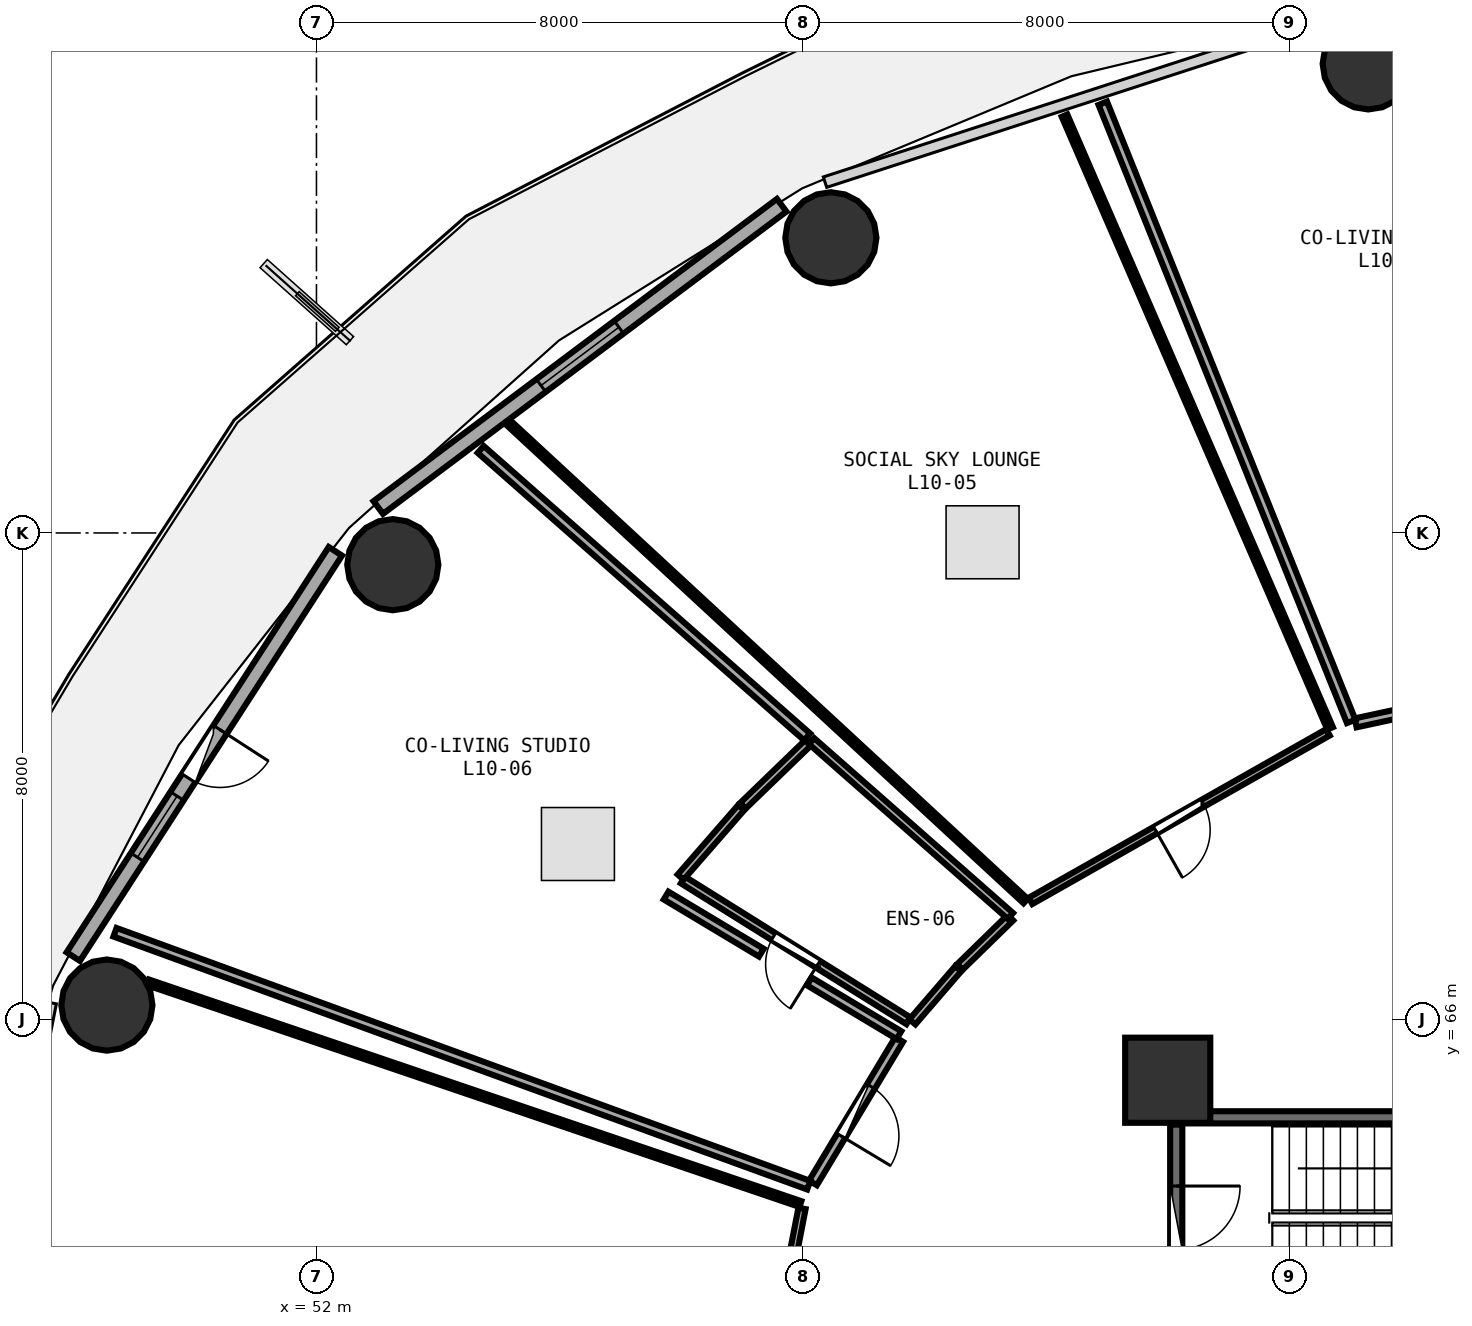
"""IFC4 building model, lengths in metres.
Left out: names, types, materials, properties, quantities, classifications, styles, units other than length and angle.
Written with IfcOpenShell. Run it as: python <this file> out.ifc"""

import sys

from ifc_helpers import new_model, si_unit, direction, frame, frame_2d, origin, origin_2d, place, context, subcontext, project, spatial, rectangle, circle, extrude, element, fill, save


model = new_model("IFC4")
c1 = context("Model", 3, precision=1e-05, world=origin(), true_north=direction((0.0, 1.0)))
c2 = subcontext(c1, "Body", "Model", "MODEL_VIEW")
j1 = project(units=[si_unit("LENGTHUNIT", "METRE"), si_unit("PLANEANGLEUNIT", "RADIAN")], contexts=[c1])
p1 = place(None, origin())
s1 = spatial("IfcSite", under=j1, at=p1, CompositionType="ELEMENT")
p2 = place(p1, origin())
s2 = spatial("IfcBuilding", under=s1, at=p2, CompositionType="ELEMENT")
p3 = place(p2, frame((0.0, 0.0, 41.25)))
s3 = spatial("IfcBuildingStorey", under=s2, at=p3, CompositionType="ELEMENT", Elevation=41.25)
p4 = place(p3, frame((66.0, 65.0, 0.0), z_axis=(0.0, 0.0, 1.0), x_axis=(1.0, 0.0, 0.0)))
e1 = element("IfcColumn", 1, at=p4, inside=s3, PredefinedType="PILASTER", context=c2, shape_type="SweptSolid", body=[
    extrude(rectangle(XDim=1.4, YDim=1.4, at=origin_2d()), origin(), (0.0, 0.0, 1.0), 3.75),
])
for number, where, z_axis, x_axis in (
    (2, (69.298, 81.714, 0.0), (0.0, 0.0, 1.0), (1.0, 0.0, 0.0)),
    (3, (60.46, 78.854, 0.0), (0.0, 0.0, 1.0), (1.0, 0.0, 0.0)),
    (4, (53.256, 73.478, 0.0), (0.0, 0.0, 1.0), (1.0, 0.0, 0.0)),
    (5, (48.553, 66.236, 0.0), (0.0, 0.0, 1.0), (1.0, 0.0, 0.0)),
):
    element("IfcColumn", number, at=place(p3, frame(where, z_axis=z_axis, x_axis=x_axis)), inside=s3, PredefinedType="COLUMN", context=c2, shape_type="SweptSolid", body=[
        extrude(circle(Radius=0.75, at=origin_2d()), origin(), (0.0, 0.0, 1.0), 3.75),
    ])
p5 = place(p3, frame((59.651, 79.389, 0.0), z_axis=(0.0, 0.0, 1.0), x_axis=(-0.80030733173, -0.599590005569, 0.0)))
e6 = element("IfcWall", 6, at=p5, inside=s3, PredefinedType="SOLIDWALL", context=c2, shape_type="SweptSolid", body=[
    extrude(rectangle(XDim=8.291, YDim=0.26, at=frame_2d((4.145, 0.0))), origin(), (0.0, 0.0, 1.0), 3.475),
])
p6 = place(p5, frame((3.345, 0.0, 0.85)))
e7 = element("IfcOpeningElement", 7, at=p6, cuts=e6, PredefinedType="OPENING", context=c2, shape_type="SweptSolid", body=[
    extrude(rectangle(XDim=1.6, YDim=1.45, at=frame_2d((0.8, 0.725))), frame((0.0, 0.14, 0.0), z_axis=(0.0, -1.0, 0.0), x_axis=(1.0, 0.0, 0.0)), (0.0, 0.0, 1.0), 0.28),
])
p7 = place(p3, frame((52.311, 73.698, 0.0), z_axis=(0.0, 0.0, 1.0), x_axis=(-0.543005114258, -0.839729388488, 0.0)))
e8 = element("IfcWall", 8, at=p7, inside=s3, PredefinedType="SOLIDWALL", context=c2, shape_type="SweptSolid", body=[
    extrude(rectangle(XDim=7.938, YDim=0.26, at=frame_2d((3.969, 0.0))), origin(), (0.0, 0.0, 1.0), 3.475),
])
p8 = place(p7, frame((3.494, 0.0, 0.0)))
e9 = element("IfcOpeningElement", 9, at=p8, cuts=e8, PredefinedType="OPENING", context=c2, shape_type="SweptSolid", body=[
    extrude(rectangle(XDim=0.95, YDim=2.1, at=frame_2d((0.475, 1.05))), frame((0.0, 0.14, 0.0), z_axis=(0.0, -1.0, 0.0), x_axis=(1.0, 0.0, 0.0)), (0.0, 0.0, 1.0), 0.28),
])
p9 = place(p7, frame((4.794, 0.0, 0.85)))
e10 = element("IfcOpeningElement", 10, at=p9, cuts=e8, PredefinedType="OPENING", context=c2, shape_type="SweptSolid", body=[
    extrude(rectangle(XDim=1.2, YDim=1.45, at=frame_2d((0.6, 0.725))), frame((0.0, 0.14, 0.0), z_axis=(0.0, -1.0, 0.0), x_axis=(1.0, 0.0, 0.0)), (0.0, 0.0, 1.0), 0.28),
])
p10 = place(p3, frame((73.42, 64.39, 0.0), z_axis=(0.0, 0.0, 1.0), x_axis=(-1.0, 0.0, 0.0)))
e11 = element("IfcWall", 11, at=p10, inside=s3, PredefinedType="SHEAR", context=c2, shape_type="SweptSolid", body=[
    extrude(rectangle(XDim=7.16, YDim=0.2, at=frame_2d((3.58, 0.0))), origin(), (0.0, 0.0, 1.0), 3.49),
])
p11 = place(p3, frame((66.14, 64.27, 0.0), z_axis=(0.0, 0.0, 1.0), x_axis=(0.0, -1.0, 0.0)))
e12 = element("IfcWall", 12, at=p11, inside=s3, PredefinedType="SHEAR", context=c2, shape_type="SweptSolid", body=[
    extrude(rectangle(XDim=3.07, YDim=0.2, at=frame_2d((1.535, 0.0))), origin(), (0.0, 0.0, 1.0), 3.49),
])
p12 = place(p11, frame((1.01, 0.0, 0.0)))
e13 = element("IfcOpeningElement", 13, at=p12, cuts=e12, PredefinedType="OPENING", context=c2, shape_type="SweptSolid", body=[
    extrude(rectangle(XDim=1.05, YDim=2.1, at=frame_2d((0.525, 1.05))), frame((0.0, 0.11, 0.0), z_axis=(0.0, -1.0, 0.0), x_axis=(1.0, 0.0, 0.0)), (0.0, 0.0, 1.0), 0.22),
])
p13 = place(p3, frame((71.981, 71.501, 0.0), z_axis=(0.0, 0.0, 1.0), x_axis=(-0.977451938751, -0.211158015313, 0.0)))
e14 = element("IfcWall", 14, at=p13, inside=s3, PredefinedType="PARTITIONING", context=c2, shape_type="SweptSolid", body=[
    extrude(rectangle(XDim=2.958, YDim=0.15, at=frame_2d((1.479, 0.0))), origin(), (0.0, 0.0, 1.0), 2.875),
])
p14 = place(p13, frame((1.004, 0.0, 0.0)))
e15 = element("IfcOpeningElement", 15, at=p14, cuts=e14, PredefinedType="OPENING", context=c2, shape_type="SweptSolid", body=[
    extrude(rectangle(XDim=0.95, YDim=2.08, at=frame_2d((0.475, 1.04))), frame((0.0, 0.085, 0.0), z_axis=(0.0, -1.0, 0.0), x_axis=(1.0, 0.0, 0.0)), (0.0, 0.0, 1.0), 0.17),
])
p15 = place(p3, frame((68.635, 70.72, 0.0), z_axis=(0.0, 0.0, 1.0), x_axis=(-0.870068136537, -0.49293147372, 0.0)))
e16 = element("IfcWall", 16, at=p15, inside=s3, PredefinedType="PARTITIONING", context=c2, shape_type="SweptSolid", body=[
    extrude(rectangle(XDim=5.621, YDim=0.12, at=frame_2d((2.811, 0.0))), origin(), (0.0, 0.0, 1.0), 2.875),
])
p16 = place(p15, frame((2.36, 0.0, 0.0)))
e17 = element("IfcOpeningElement", 17, at=p16, cuts=e16, PredefinedType="OPENING", context=c2, shape_type="SweptSolid", body=[
    extrude(rectangle(XDim=0.9, YDim=2.08, at=frame_2d((0.45, 1.04))), frame((0.0, 0.07, 0.0), z_axis=(0.0, -1.0, 0.0), x_axis=(1.0, 0.0, 0.0)), (0.0, 0.0, 1.0), 0.14),
])
p17 = place(p3, frame((61.737, 65.977, 0.0), z_axis=(0.0, 0.0, 1.0), x_axis=(-0.848252205707, 0.529592480605, 0.0)))
e18 = element("IfcWall", 18, at=p17, inside=s3, PredefinedType="PLUMBINGWALL", context=c2, shape_type="SweptSolid", body=[
    extrude(rectangle(XDim=4.374, YDim=0.13, at=frame_2d((2.187, 0.0))), origin(), (0.0, 0.0, 1.0), 3.235),
])
p18 = place(p17, frame((1.757, 0.0, 0.0)))
e19 = element("IfcOpeningElement", 19, at=p18, cuts=e18, PredefinedType="OPENING", context=c2, shape_type="SweptSolid", body=[
    extrude(rectangle(XDim=0.86, YDim=2.05, at=frame_2d((0.43, 1.025))), frame((0.0, 0.075, 0.0), z_axis=(0.0, -1.0, 0.0), x_axis=(1.0, 0.0, 0.0)), (0.0, 0.0, 1.0), 0.15),
])
p19 = place(p3, frame((61.583, 65.67, 0.0), z_axis=(0.0, 0.0, 1.0), x_axis=(-0.515343511704, -0.85698370168, 0.0)))
e20 = element("IfcWall", 20, at=p19, inside=s3, PredefinedType="PARTITIONING", context=c2, shape_type="SweptSolid", body=[
    extrude(rectangle(XDim=2.752, YDim=0.15, at=frame_2d((1.376, 0.0))), origin(), (0.0, 0.0, 1.0), 2.875),
])
p20 = place(p19, frame((0.901, 0.0, 0.0)))
e21 = element("IfcOpeningElement", 21, at=p20, cuts=e20, PredefinedType="OPENING", context=c2, shape_type="SweptSolid", body=[
    extrude(rectangle(XDim=0.95, YDim=2.08, at=frame_2d((0.475, 1.04))), frame((0.0, 0.085, 0.0), z_axis=(0.0, -1.0, 0.0), x_axis=(1.0, 0.0, 0.0)), (0.0, 0.0, 1.0), 0.17),
])
p21 = place(p3, frame((59.986, 62.892, 0.0), z_axis=(0.0, 0.0, 1.0), x_axis=(-0.190897102704, -0.981610053015, 0.0)))
e22 = element("IfcWall", 22, at=p21, inside=s3, PredefinedType="PARTITIONING", context=c2, shape_type="SweptSolid", body=[
    extrude(rectangle(XDim=5.239, YDim=0.12, at=frame_2d((2.619, 0.0))), origin(), (0.0, 0.0, 1.0), 2.875),
])
p22 = place(p21, frame((2.169, 0.0, 0.0)))
e23 = element("IfcOpeningElement", 23, at=p22, cuts=e22, PredefinedType="OPENING", context=c2, shape_type="SweptSolid", body=[
    extrude(rectangle(XDim=0.9, YDim=2.08, at=frame_2d((0.45, 1.04))), frame((0.0, 0.07, 0.0), z_axis=(0.0, -1.0, 0.0), x_axis=(1.0, 0.0, 0.0)), (0.0, 0.0, 1.0), 0.14),
])
p23 = place(p3, frame((69.017, 70.901, 0.0), z_axis=(0.0, 0.0, 1.0), x_axis=(-0.372877076454, 0.927880749803, 0.0)))
e24 = element("IfcWall", 24, at=p23, inside=s3, PredefinedType="PARTITIONING", context=c2, shape_type="SweptSolid", body=[
    extrude(rectangle(XDim=10.956, YDim=0.15, at=frame_2d((5.478, 0.0))), origin(), (0.0, 0.0, 1.0), 2.875),
])
p24 = place(p3, frame((63.663, 67.947, 0.0), z_axis=(0.0, 0.0, 1.0), x_axis=(-0.734175040947, 0.678960241288, 0.0)))
e25 = element("IfcWall", 25, at=p24, inside=s3, PredefinedType="PARTITIONING", context=c2, shape_type="SweptSolid", body=[
    extrude(rectangle(XDim=11.549, YDim=0.1, at=frame_2d((5.775, 0.0))), origin(), (0.0, 0.0, 1.0), 2.875),
])
p25 = place(p3, frame((64.303, 80.863, 0.0), z_axis=(0.0, 0.0, 1.0), x_axis=(0.397730954589, -0.917502091421, 0.0)))
e26 = element("IfcWall", 26, at=p25, inside=s3, PredefinedType="PARTITIONING", context=c2, shape_type="SweptSolid", body=[
    extrude(rectangle(XDim=10.983, YDim=0.1, at=frame_2d((5.491, 0.0))), origin(), (0.0, 0.0, 1.0), 2.875),
])
p26 = place(p3, frame((63.414, 67.674, 0.0), z_axis=(0.0, 0.0, 1.0), x_axis=(-0.715868961368, -0.698234652642, 0.0)))
e27 = element("IfcWall", 27, at=p26, inside=s3, PredefinedType="PLUMBINGWALL", context=c2, shape_type="SweptSolid", body=[
    extrude(rectangle(XDim=1.163, YDim=0.13, at=frame_2d((0.582, 0.0))), origin(), (0.0, 0.0, 1.0), 2.875),
])
p27 = place(p3, frame((62.554, 66.833, 0.0), z_axis=(0.0, 0.0, 1.0), x_axis=(-0.6531951623, -0.757189593133, 0.0)))
e28 = element("IfcWall", 28, at=p27, inside=s3, PredefinedType="PLUMBINGWALL", context=c2, shape_type="SweptSolid", body=[
    extrude(rectangle(XDim=1.153, YDim=0.13, at=frame_2d((0.576, 0.0))), origin(), (0.0, 0.0, 1.0), 3.48),
])
p28 = place(p3, frame((57.989, 68.34, 0.0), z_axis=(0.0, 0.0, 1.0), x_axis=(0.657010944672, 0.75388103742, 0.0)))
e29 = element("IfcWall", 29, at=p28, inside=s3, PredefinedType="PLUMBINGWALL", context=c2, shape_type="SweptSolid", body=[
    extrude(rectangle(XDim=1.517, YDim=0.13, at=frame_2d((0.759, 0.0))), origin(), (0.0, 0.0, 1.0), 2.875),
])
p29 = place(p3, frame((59.013, 69.513, 0.0), z_axis=(0.0, 0.0, 1.0), x_axis=(0.719052166998, 0.69495610015, 0.0)))
e30 = element("IfcWall", 30, at=p29, inside=s3, PredefinedType="PLUMBINGWALL", context=c2, shape_type="SweptSolid", body=[
    extrude(rectangle(XDim=1.53, YDim=0.13, at=frame_2d((0.765, 0.0))), origin(), (0.0, 0.0, 1.0), 2.875),
])
p30 = place(p3, frame((60.143, 70.577, 0.0), z_axis=(0.0, 0.0, 1.0), x_axis=(0.750928130077, -0.660383936403, 0.0)))
e31 = element("IfcWall", 31, at=p30, inside=s3, PredefinedType="PLUMBINGWALL", context=c2, shape_type="SweptSolid", body=[
    extrude(rectangle(XDim=4.355, YDim=0.13, at=frame_2d((2.177, 0.0))), origin(), (0.0, 0.0, 1.0), 3.235),
])
p31 = place(p3, frame((60.096, 63.274, 0.0), z_axis=(0.0, 0.0, 1.0), x_axis=(-0.939512545551, 0.342514491304, 0.0)))
e32 = element("IfcWall", 32, at=p31, inside=s3, PredefinedType="PARTITIONING", context=c2, shape_type="SweptSolid", body=[
    extrude(rectangle(XDim=12.145, YDim=0.15, at=frame_2d((6.072, 0.0))), origin(), (0.0, 0.0, 1.0), 2.875),
])
p32 = place(p3, frame((54.701, 75.374, 0.0), z_axis=(0.0, 0.0, 1.0), x_axis=(0.750492781032, -0.660878646666, 0.0)))
e33 = element("IfcWall", 33, at=p32, inside=s3, PredefinedType="PARTITIONING", context=c2, shape_type="SweptSolid", body=[
    extrude(rectangle(XDim=7.154, YDim=0.15, at=frame_2d((3.577, 0.0))), origin(), (0.0, 0.0, 1.0), 2.875),
])
p33 = place(p3, frame((57.75, 68.036, 0.0), z_axis=(0.0, 0.0, 1.0), x_axis=(0.857787746423, -0.514004068161, 0.0)))
e34 = element("IfcWall", 34, at=p33, inside=s3, PredefinedType="PARTITIONING", context=c2, shape_type="SweptSolid", body=[
    extrude(rectangle(XDim=1.826, YDim=0.15, at=frame_2d((0.913, 0.0))), origin(), (0.0, 0.0, 1.0), 3.48),
])
p34 = place(p3, frame((60.106, 66.625, 0.0), z_axis=(0.0, 0.0, 1.0), x_axis=(0.8577560852, -0.514056901814, 0.0)))
e35 = element("IfcWall", 35, at=p34, inside=s3, PredefinedType="PARTITIONING", context=c2, shape_type="SweptSolid", body=[
    extrude(rectangle(XDim=1.718, YDim=0.15, at=frame_2d((0.859, 0.0))), origin(), (0.0, 0.0, 1.0), 3.235),
])
p35 = place(p3, frame((49.233, 66.608, 0.0), z_axis=(0.0, 0.0, 1.0), x_axis=(0.946848647549, -0.321679403499, 0.0)))
e36 = element("IfcWall", 36, at=p35, inside=s3, PredefinedType="PARTITIONING", context=c2, shape_type="SweptSolid", body=[
    extrude(rectangle(XDim=11.328, YDim=0.1, at=frame_2d((5.664, 0.0))), origin(), (0.0, 0.0, 1.0), 2.875),
])
p36 = place(p6, origin())
e37 = element("IfcWindow", 37, at=p36, inside=s3, PartitioningType="SINGLE_PANEL", PredefinedType="WINDOW", context=c2, shape_type="SweptSolid", body=[
    extrude(rectangle(XDim=1.6, YDim=1.45, at=frame_2d((0.8, 0.725))), frame((0.0, 0.03, 0.0), z_axis=(0.0, -1.0, 0.0), x_axis=(1.0, 0.0, 0.0)), (0.0, 0.0, 1.0), 0.06),
])
fill(e7, e37)
p37 = place(p8, frame((0.95, 0.0, 0.0), z_axis=(0.0, 0.0, 1.0), x_axis=(-1.0, 0.0, 0.0)))
e38 = element("IfcDoor", 38, at=p37, inside=s3, OperationType="SINGLE_SWING_RIGHT", PredefinedType="DOOR", context=c2, shape_type="SweptSolid", body=[
    extrude(rectangle(XDim=0.95, YDim=2.1, at=frame_2d((0.475, 1.05))), frame((0.0, 0.025, 0.0), z_axis=(0.0, -1.0, 0.0), x_axis=(1.0, 0.0, 0.0)), (0.0, 0.0, 1.0), 0.05),
])
fill(e9, e38)
p38 = place(p9, origin())
e39 = element("IfcWindow", 39, at=p38, inside=s3, PartitioningType="SINGLE_PANEL", PredefinedType="WINDOW", context=c2, shape_type="SweptSolid", body=[
    extrude(rectangle(XDim=1.2, YDim=1.45, at=frame_2d((0.6, 0.725))), frame((0.0, 0.03, 0.0), z_axis=(0.0, -1.0, 0.0), x_axis=(1.0, 0.0, 0.0)), (0.0, 0.0, 1.0), 0.06),
])
fill(e10, e39)
p39 = place(p12, origin())
e40 = element("IfcDoor", 40, at=p39, inside=s3, OperationType="SINGLE_SWING_LEFT", PredefinedType="DOOR", context=c2, shape_type="SweptSolid", body=[
    extrude(rectangle(XDim=1.05, YDim=2.1, at=frame_2d((0.525, 1.05))), frame((0.0, 0.025, 0.0), z_axis=(0.0, -1.0, 0.0), x_axis=(1.0, 0.0, 0.0)), (0.0, 0.0, 1.0), 0.05),
])
fill(e13, e40)
p40 = place(p16, origin())
e41 = element("IfcDoor", 41, at=p40, inside=s3, OperationType="SINGLE_SWING_RIGHT", PredefinedType="DOOR", context=c2, shape_type="SweptSolid", body=[
    extrude(rectangle(XDim=0.9, YDim=2.08, at=frame_2d((0.45, 1.04))), frame((0.0, 0.025, 0.0), z_axis=(0.0, -1.0, 0.0), x_axis=(1.0, 0.0, 0.0)), (0.0, 0.0, 1.0), 0.05),
])
fill(e17, e41)
p41 = place(p18, origin())
e42 = element("IfcDoor", 42, at=p41, inside=s3, OperationType="SINGLE_SWING_LEFT", PredefinedType="DOOR", context=c2, shape_type="SweptSolid", body=[
    extrude(rectangle(XDim=0.86, YDim=2.05, at=frame_2d((0.43, 1.025))), frame((0.0, 0.025, 0.0), z_axis=(0.0, -1.0, 0.0), x_axis=(1.0, 0.0, 0.0)), (0.0, 0.0, 1.0), 0.05),
])
fill(e19, e42)
p42 = place(p20, origin())
e43 = element("IfcDoor", 43, at=p42, inside=s3, OperationType="SINGLE_SWING_RIGHT", PredefinedType="DOOR", context=c2, shape_type="SweptSolid", body=[
    extrude(rectangle(XDim=0.95, YDim=2.08, at=frame_2d((0.475, 1.04))), frame((0.0, 0.025, 0.0), z_axis=(0.0, -1.0, 0.0), x_axis=(1.0, 0.0, 0.0)), (0.0, 0.0, 1.0), 0.05),
])
fill(e21, e43)
save(model, sys.argv[1])
